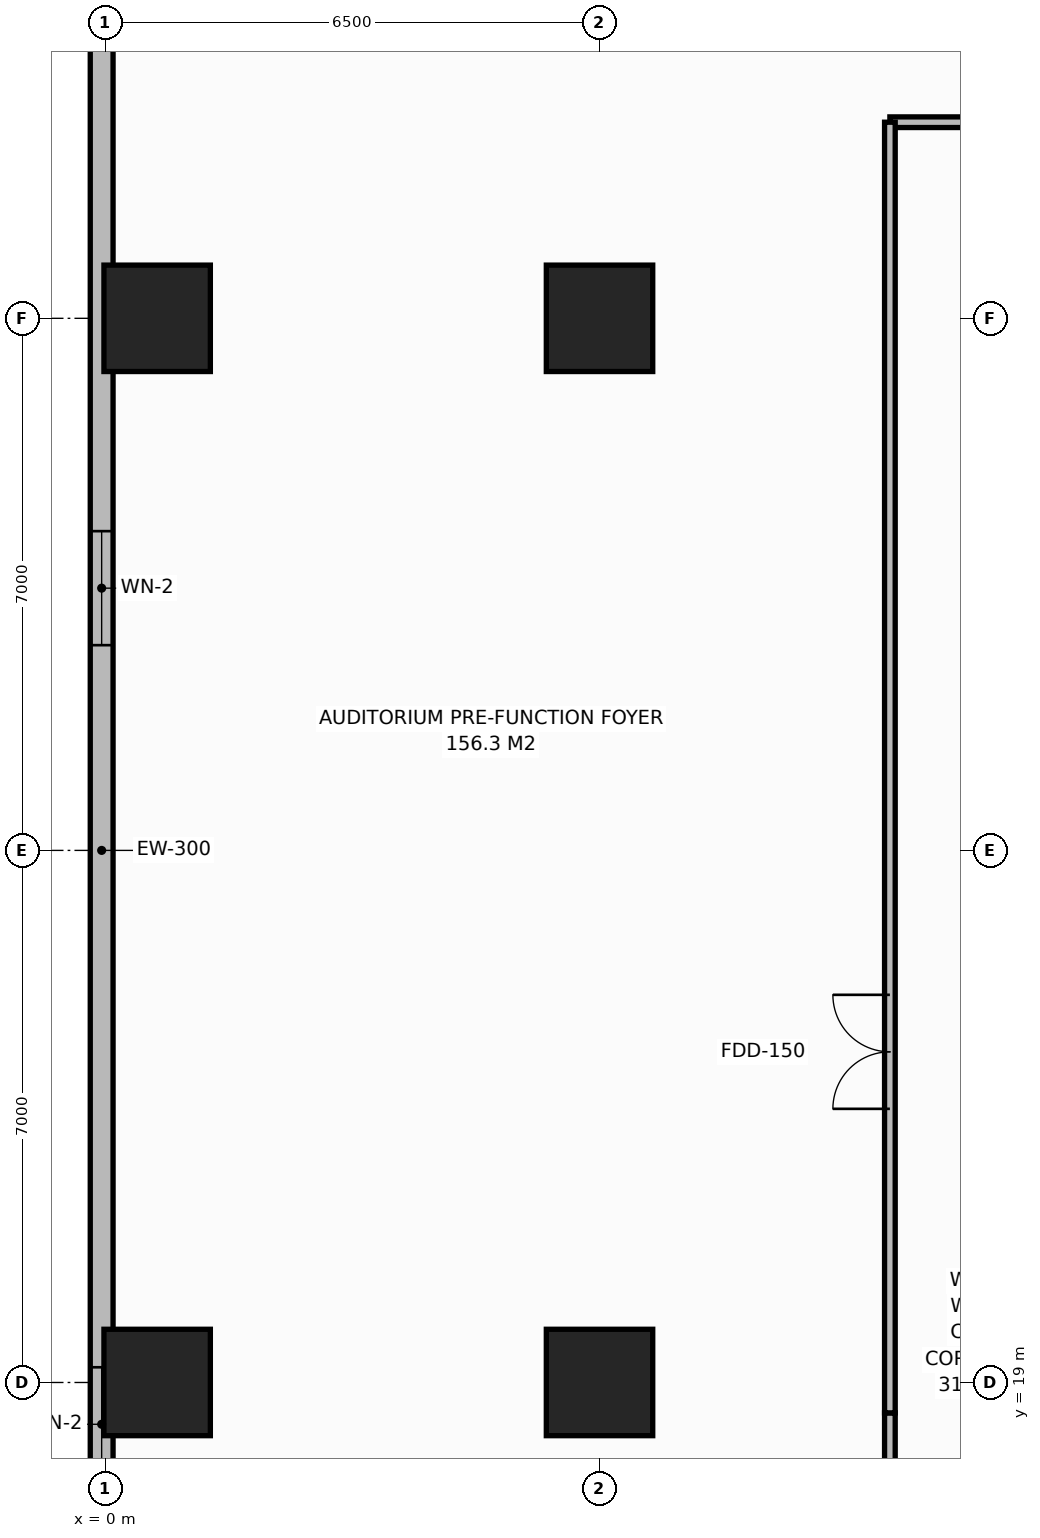
"""IFC4 building model, lengths in metres.
Left out: names, types, materials, properties, quantities, classifications, styles, units other than length and angle.
Written with IfcOpenShell. Run it as: python <this file> out.ifc"""

import sys

from ifc_helpers import new_model, si_unit, direction, frame, frame_2d, origin, origin_2d, place, context, subcontext, project, spatial, rectangle, extrude, element, fill, save


model = new_model("IFC4")
c1 = context("Model", 3, precision=1e-05, world=origin(), true_north=direction((0.0, 1.0)))
c2 = subcontext(c1, "Body", "Model", "MODEL_VIEW")
j1 = project(units=[si_unit("LENGTHUNIT", "METRE"), si_unit("PLANEANGLEUNIT", "RADIAN")], contexts=[c1])
p1 = place(None, origin())
s1 = spatial("IfcSite", under=j1, at=p1, CompositionType="ELEMENT")
p2 = place(p1, origin())
s2 = spatial("IfcBuilding", under=s1, at=p2, CompositionType="ELEMENT")
p3 = place(p2, frame((0.0, 0.0, 11.5)))
s3 = spatial("IfcBuildingStorey", under=s2, at=p3, CompositionType="ELEMENT", Elevation=11.5)
for number, where, z_axis, x_axis in (
    (1, (6.5, 19.0, 0.0), (0.0, 0.0, 1.0), (1.0, 0.0, 0.0)),
    (2, (6.5, 33.0, 0.0), (0.0, 0.0, 1.0), (1.0, 0.0, 0.0)),
    (3, (0.68, 19.0, 0.0), (0.0, 0.0, 1.0), (1.0, 0.0, 0.0)),
    (4, (0.68, 33.0, 0.0), (0.0, 0.0, 1.0), (1.0, 0.0, 0.0)),
):
    element("IfcColumn", number, at=place(p3, frame(where, z_axis=z_axis, x_axis=x_axis)), inside=s3, PredefinedType="COLUMN", context=c2, shape_type="SweptSolid", body=[
        extrude(rectangle(XDim=1.4, YDim=1.4, at=origin_2d()), origin(), (0.0, 0.0, 1.0), 5.5),
    ])
p4 = place(p3, frame((-0.05, 3.2, 0.0), z_axis=(0.0, 0.0, 1.0), x_axis=(0.0, 1.0, 0.0)))
e5 = element("IfcWall", 5, at=p4, inside=s3, PredefinedType="STANDARD", context=c2, shape_type="SweptSolid", body=[
    extrude(rectangle(XDim=45.6, YDim=0.3, at=frame_2d((22.8, 0.0))), origin(), (0.0, 0.0, 1.0), 5.22),
])
p5 = place(p4, frame((5.0, 0.0, 0.9)))
e6 = element("IfcOpeningElement", 6, at=p5, cuts=e5, PredefinedType="OPENING", context=c2, shape_type="SweptSolid", body=[
    extrude(rectangle(XDim=1.5, YDim=2.2, at=frame_2d((0.75, 1.1))), frame((0.0, 0.16, 0.0), z_axis=(0.0, -1.0, 0.0), x_axis=(1.0, 0.0, 0.0)), (0.0, 0.0, 1.0), 0.32),
])
p6 = place(p4, frame((14.5, 0.0, 0.9)))
e7 = element("IfcOpeningElement", 7, at=p6, cuts=e5, PredefinedType="OPENING", context=c2, shape_type="SweptSolid", body=[
    extrude(rectangle(XDim=1.5, YDim=2.2, at=frame_2d((0.75, 1.1))), frame((0.0, 0.16, 0.0), z_axis=(0.0, -1.0, 0.0), x_axis=(1.0, 0.0, 0.0)), (0.0, 0.0, 1.0), 0.32),
])
p7 = place(p4, frame((25.5, 0.0, 0.9)))
e8 = element("IfcOpeningElement", 8, at=p7, cuts=e5, PredefinedType="OPENING", context=c2, shape_type="SweptSolid", body=[
    extrude(rectangle(XDim=1.5, YDim=2.2, at=frame_2d((0.75, 1.1))), frame((0.0, 0.16, 0.0), z_axis=(0.0, -1.0, 0.0), x_axis=(1.0, 0.0, 0.0)), (0.0, 0.0, 1.0), 0.32),
])
p8 = place(p4, frame((35.0, 0.0, 0.9)))
e9 = element("IfcOpeningElement", 9, at=p8, cuts=e5, PredefinedType="OPENING", context=c2, shape_type="SweptSolid", body=[
    extrude(rectangle(XDim=1.5, YDim=2.2, at=frame_2d((0.75, 1.1))), frame((0.0, 0.16, 0.0), z_axis=(0.0, -1.0, 0.0), x_axis=(1.0, 0.0, 0.0)), (0.0, 0.0, 1.0), 0.32),
])
p9 = place(p3, frame((10.32, 35.58, 0.0), z_axis=(0.0, 0.0, 1.0), x_axis=(1.0, 0.0, 0.0)))
e10 = element("IfcWall", 10, at=p9, inside=s3, PredefinedType="PARTITIONING", context=c2, shape_type="SweptSolid", body=[
    extrude(rectangle(XDim=15.6, YDim=0.14, at=frame_2d((7.8, 0.0))), origin(), (0.0, 0.0, 1.0), 5.22),
])
p10 = place(p9, frame((10.78, 0.0, 0.0)))
e11 = element("IfcOpeningElement", 11, at=p10, cuts=e10, PredefinedType="OPENING", context=c2, shape_type="SweptSolid", body=[
    extrude(rectangle(XDim=0.9, YDim=2.15, at=frame_2d((0.45, 1.075))), frame((0.0, 0.08, 0.0), z_axis=(0.0, -1.0, 0.0), x_axis=(1.0, 0.0, 0.0)), (0.0, 0.0, 1.0), 0.16),
])
p11 = place(p9, frame((13.63, 0.0, 0.0)))
e12 = element("IfcOpeningElement", 12, at=p11, cuts=e10, PredefinedType="OPENING", context=c2, shape_type="SweptSolid", body=[
    extrude(rectangle(XDim=0.9, YDim=2.15, at=frame_2d((0.45, 1.075))), frame((0.0, 0.08, 0.0), z_axis=(0.0, -1.0, 0.0), x_axis=(1.0, 0.0, 0.0)), (0.0, 0.0, 1.0), 0.16),
])
p12 = place(p9, frame((1.2, 0.0, 0.0)))
e13 = element("IfcOpeningElement", 13, at=p12, cuts=e10, PredefinedType="OPENING", context=c2, shape_type="SweptSolid", body=[
    extrude(rectangle(XDim=0.95, YDim=2.15, at=frame_2d((0.475, 1.075))), frame((0.0, 0.08, 0.0), z_axis=(0.0, -1.0, 0.0), x_axis=(1.0, 0.0, 0.0)), (0.0, 0.0, 1.0), 0.16),
])
p13 = place(p9, frame((5.8, 0.0, 0.0)))
e14 = element("IfcOpeningElement", 14, at=p13, cuts=e10, PredefinedType="OPENING", context=c2, shape_type="SweptSolid", body=[
    extrude(rectangle(XDim=0.95, YDim=2.15, at=frame_2d((0.475, 1.075))), frame((0.0, 0.08, 0.0), z_axis=(0.0, -1.0, 0.0), x_axis=(1.0, 0.0, 0.0)), (0.0, 0.0, 1.0), 0.16),
])
p14 = place(p3, frame((10.32, 16.42, 0.0), z_axis=(0.0, 0.0, 1.0), x_axis=(0.0, 1.0, 0.0)))
e15 = element("IfcWall", 15, at=p14, inside=s3, PredefinedType="PARTITIONING", context=c2, shape_type="SweptSolid", body=[
    extrude(rectangle(XDim=2.18, YDim=0.14, at=frame_2d((1.09, 0.0))), origin(), (0.0, 0.0, 1.0), 5.22),
])
p15 = place(p3, frame((10.32, 18.6, 0.0), z_axis=(0.0, 0.0, 1.0), x_axis=(0.0, 1.0, 0.0)))
e16 = element("IfcWall", 16, at=p15, inside=s3, PredefinedType="PARTITIONING", context=c2, shape_type="SweptSolid", body=[
    extrude(rectangle(XDim=16.98, YDim=0.14, at=frame_2d((8.49, 0.0))), origin(), (0.0, 0.0, 1.0), 5.22),
])
p16 = place(p15, frame((4.0, 0.0, 0.0)))
e17 = element("IfcOpeningElement", 17, at=p16, cuts=e16, PredefinedType="OPENING", context=c2, shape_type="SweptSolid", body=[
    extrude(rectangle(XDim=1.5, YDim=2.2, at=frame_2d((0.75, 1.1))), frame((0.0, 0.08, 0.0), z_axis=(0.0, -1.0, 0.0), x_axis=(1.0, 0.0, 0.0)), (0.0, 0.0, 1.0), 0.16),
])
p17 = place(p6, origin())
e18 = element("IfcWindow", 18, at=p17, inside=s3, PartitioningType="SINGLE_PANEL", PredefinedType="WINDOW", context=c2, shape_type="SweptSolid", body=[
    extrude(rectangle(XDim=1.5, YDim=2.2, at=frame_2d((0.75, 1.1))), frame((0.0, 0.03, 0.0), z_axis=(0.0, -1.0, 0.0), x_axis=(1.0, 0.0, 0.0)), (0.0, 0.0, 1.0), 0.06),
])
fill(e7, e18)
p18 = place(p7, origin())
e19 = element("IfcWindow", 19, at=p18, inside=s3, PartitioningType="SINGLE_PANEL", PredefinedType="WINDOW", context=c2, shape_type="SweptSolid", body=[
    extrude(rectangle(XDim=1.5, YDim=2.2, at=frame_2d((0.75, 1.1))), frame((0.0, 0.03, 0.0), z_axis=(0.0, -1.0, 0.0), x_axis=(1.0, 0.0, 0.0)), (0.0, 0.0, 1.0), 0.06),
])
fill(e8, e19)
p19 = place(p16, origin())
e20 = element("IfcDoor", 20, at=p19, inside=s3, OperationType="DOUBLE_DOOR_SINGLE_SWING", PredefinedType="DOOR", context=c2, shape_type="SweptSolid", body=[
    extrude(rectangle(XDim=1.5, YDim=2.2, at=frame_2d((0.75, 1.1))), frame((0.0, 0.025, 0.0), z_axis=(0.0, -1.0, 0.0), x_axis=(1.0, 0.0, 0.0)), (0.0, 0.0, 1.0), 0.05),
])
fill(e17, e20)
save(model, sys.argv[1])
